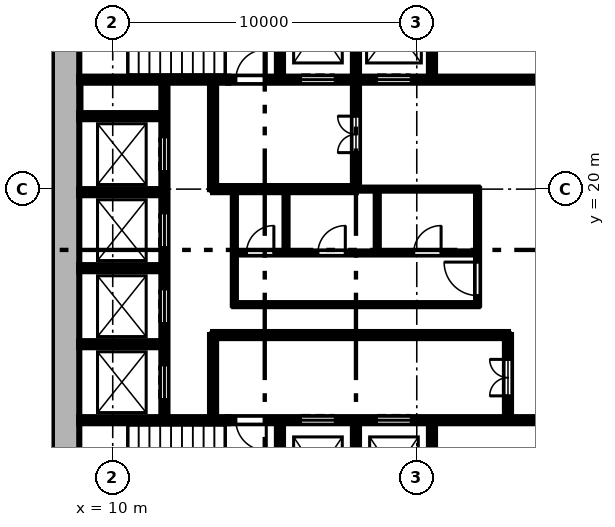
"""IFC4 building model, lengths in metres.
Left out: names, types, materials, properties, quantities, classifications, styles, units other than length and angle.
Written with IfcOpenShell. Run it as: python <this file> out.ifc"""

import sys

from ifc_helpers import new_model, si_unit, direction, frame, frame_2d, origin, place, context, subcontext, project, spatial, rectangle, extrude, element, fill, save


model = new_model("IFC4")
c1 = context("Model", 3, precision=1e-05, world=origin(), true_north=direction((0.0, 1.0)))
c2 = subcontext(c1, "Body", "Model", "MODEL_VIEW")
j1 = project(units=[si_unit("LENGTHUNIT", "METRE"), si_unit("PLANEANGLEUNIT", "RADIAN")], contexts=[c1])
p1 = place(None, origin())
s1 = spatial("IfcSite", under=j1, at=p1, CompositionType="ELEMENT")
p2 = place(p1, origin())
s2 = spatial("IfcBuilding", under=s1, at=p2, CompositionType="ELEMENT")
p3 = place(p2, origin())
s3 = spatial("IfcBuildingStorey", under=s2, at=p3, CompositionType="ELEMENT", Elevation=0.0)
p4 = place(p3, frame((8.45, 27.1, 0.0), z_axis=(0.0, 0.0, 1.0), x_axis=(0.0, -1.0, 0.0)))
e1 = element("IfcWall", 1, at=p4, inside=s3, PredefinedType="SHEAR", context=c2, shape_type="SweptSolid", body=[
    extrude(rectangle(XDim=18.2, YDim=0.9, at=frame_2d((9.1, 0.0))), origin(), (0.0, 0.0, 1.0), 6.0),
])
p5 = place(p3, frame((8.9, 12.4, 0.0), z_axis=(0.0, 0.0, 1.0), x_axis=(1.0, 0.0, 0.0)))
e2 = element("IfcWall", 2, at=p5, inside=s3, PredefinedType="SHEAR", context=c2, shape_type="SweptSolid", body=[
    extrude(rectangle(XDim=4.9, YDim=0.2, at=frame_2d((2.45, 0.0))), origin(), (0.0, 0.0, 1.0), 5.55),
])
p6 = place(p3, frame((13.8, 12.4, 0.0), z_axis=(0.0, 0.0, 1.0), x_axis=(1.0, 0.0, 0.0)))
e3 = element("IfcWall", 3, at=p6, inside=s3, PredefinedType="SHEAR", context=c2, shape_type="SweptSolid", body=[
    extrude(rectangle(XDim=13.3, YDim=0.2, at=frame_2d((6.65, 0.0))), origin(), (0.0, 0.0, 1.0), 5.55),
])
p7 = place(p6, frame((2.4, 0.0, 0.0)))
e4 = element("IfcOpeningElement", 4, at=p7, cuts=e3, PredefinedType="OPENING", context=c2, shape_type="SweptSolid", body=[
    extrude(rectangle(XDim=1.1, YDim=2.1, at=frame_2d((0.55, 1.05))), frame((0.0, 0.11, 0.0), z_axis=(0.0, -1.0, 0.0), x_axis=(1.0, 0.0, 0.0)), (0.0, 0.0, 1.0), 0.22),
])
p8 = place(p6, frame((4.9, 0.0, 0.0)))
e5 = element("IfcOpeningElement", 5, at=p8, cuts=e3, PredefinedType="OPENING", context=c2, shape_type="SweptSolid", body=[
    extrude(rectangle(XDim=1.1, YDim=2.1, at=frame_2d((0.55, 1.05))), frame((0.0, 0.11, 0.0), z_axis=(0.0, -1.0, 0.0), x_axis=(1.0, 0.0, 0.0)), (0.0, 0.0, 1.0), 0.22),
])
p9 = place(p6, frame((0.25, 0.0, 0.0)))
e6 = element("IfcOpeningElement", 6, at=p9, cuts=e3, PredefinedType="OPENING", context=c2, shape_type="SweptSolid", body=[
    extrude(rectangle(XDim=1.0, YDim=2.1, at=frame_2d((0.5, 1.05))), frame((0.0, 0.11, 0.0), z_axis=(0.0, -1.0, 0.0), x_axis=(1.0, 0.0, 0.0)), (0.0, 0.0, 1.0), 0.22),
])
p10 = place(p3, frame((8.9, 14.9, 0.0), z_axis=(0.0, 0.0, 1.0), x_axis=(1.0, 0.0, 0.0)))
e7 = element("IfcWall", 7, at=p10, inside=s3, PredefinedType="SHEAR", context=c2, shape_type="SweptSolid", body=[
    extrude(rectangle(XDim=2.8, YDim=0.2, at=frame_2d((1.4, 0.0))), origin(), (0.0, 0.0, 1.0), 5.55),
])
p11 = place(p3, frame((13.3, 15.2, 0.0), z_axis=(0.0, 0.0, 1.0), x_axis=(1.0, 0.0, 0.0)))
e8 = element("IfcWall", 8, at=p11, inside=s3, PredefinedType="SHEAR", context=c2, shape_type="SweptSolid", body=[
    extrude(rectangle(XDim=9.7, YDim=0.2, at=frame_2d((4.85, 0.0))), origin(), (0.0, 0.0, 1.0), 5.55),
])
p12 = place(p3, frame((14.0, 16.2, 0.0), z_axis=(0.0, 0.0, 1.0), x_axis=(1.0, 0.0, 0.0)))
e9 = element("IfcWall", 9, at=p12, inside=s3, PredefinedType="PARTITIONING", context=c2, shape_type="SweptSolid", body=[
    extrude(rectangle(XDim=8.0, YDim=0.1, at=frame_2d((4.0, 0.0))), origin(), (0.0, 0.0, 1.0), 5.55),
])
p13 = place(p3, frame((8.9, 17.4, 0.0), z_axis=(0.0, 0.0, 1.0), x_axis=(1.0, 0.0, 0.0)))
e10 = element("IfcWall", 10, at=p13, inside=s3, PredefinedType="SHEAR", context=c2, shape_type="SweptSolid", body=[
    extrude(rectangle(XDim=2.8, YDim=0.2, at=frame_2d((1.4, 0.0))), origin(), (0.0, 0.0, 1.0), 5.55),
])
p14 = place(p3, frame((14.0, 17.9, 0.0), z_axis=(0.0, 0.0, 1.0), x_axis=(1.0, 0.0, 0.0)))
e11 = element("IfcWall", 11, at=p14, inside=s3, PredefinedType="PARTITIONING", context=c2, shape_type="SweptSolid", body=[
    extrude(rectangle(XDim=8.0, YDim=0.1, at=frame_2d((4.0, 0.0))), origin(), (0.0, 0.0, 1.0), 5.55),
])
p15 = place(p14, frame((0.4, 0.0, 0.0)))
e12 = element("IfcOpeningElement", 12, at=p15, cuts=e11, PredefinedType="OPENING", context=c2, shape_type="SweptSolid", body=[
    extrude(rectangle(XDim=0.9, YDim=2.1, at=frame_2d((0.45, 1.05))), frame((0.0, 0.06, 0.0), z_axis=(0.0, -1.0, 0.0), x_axis=(1.0, 0.0, 0.0)), (0.0, 0.0, 1.0), 0.12),
])
p16 = place(p14, frame((2.75, 0.0, 0.0)))
e13 = element("IfcOpeningElement", 13, at=p16, cuts=e11, PredefinedType="OPENING", context=c2, shape_type="SweptSolid", body=[
    extrude(rectangle(XDim=0.9, YDim=2.1, at=frame_2d((0.45, 1.05))), frame((0.0, 0.06, 0.0), z_axis=(0.0, -1.0, 0.0), x_axis=(1.0, 0.0, 0.0)), (0.0, 0.0, 1.0), 0.12),
])
p17 = place(p14, frame((5.9, 0.0, 0.0)))
e14 = element("IfcOpeningElement", 14, at=p17, cuts=e11, PredefinedType="OPENING", context=c2, shape_type="SweptSolid", body=[
    extrude(rectangle(XDim=0.9, YDim=2.1, at=frame_2d((0.45, 1.05))), frame((0.0, 0.06, 0.0), z_axis=(0.0, -1.0, 0.0), x_axis=(1.0, 0.0, 0.0)), (0.0, 0.0, 1.0), 0.12),
])
p18 = place(p3, frame((8.9, 19.9, 0.0), z_axis=(0.0, 0.0, 1.0), x_axis=(1.0, 0.0, 0.0)))
e15 = element("IfcWall", 15, at=p18, inside=s3, PredefinedType="SHEAR", context=c2, shape_type="SweptSolid", body=[
    extrude(rectangle(XDim=2.8, YDim=0.2, at=frame_2d((1.4, 0.0))), origin(), (0.0, 0.0, 1.0), 5.55),
])
p19 = place(p3, frame((18.0, 20.0, 0.0), z_axis=(0.0, 0.0, 1.0), x_axis=(1.0, 0.0, 0.0)))
e16 = element("IfcWall", 16, at=p19, inside=s3, PredefinedType="PARTITIONING", context=c2, shape_type="SweptSolid", body=[
    extrude(rectangle(XDim=4.0, YDim=0.1, at=frame_2d((2.0, 0.0))), origin(), (0.0, 0.0, 1.0), 5.55),
])
p20 = place(p3, frame((13.3, 20.0, 0.0), z_axis=(0.0, 0.0, 1.0), x_axis=(1.0, 0.0, 0.0)))
e17 = element("IfcWall", 17, at=p20, inside=s3, PredefinedType="SHEAR", context=c2, shape_type="SweptSolid", body=[
    extrude(rectangle(XDim=4.7, YDim=0.2, at=frame_2d((2.35, 0.0))), origin(), (0.0, 0.0, 1.0), 5.55),
])
p21 = place(p3, frame((8.9, 22.4, 0.0), z_axis=(0.0, 0.0, 1.0), x_axis=(1.0, 0.0, 0.0)))
e18 = element("IfcWall", 18, at=p21, inside=s3, PredefinedType="SHEAR", context=c2, shape_type="SweptSolid", body=[
    extrude(rectangle(XDim=2.8, YDim=0.2, at=frame_2d((1.4, 0.0))), origin(), (0.0, 0.0, 1.0), 5.55),
])
p22 = place(p3, frame((8.9, 23.6, 0.0), z_axis=(0.0, 0.0, 1.0), x_axis=(1.0, 0.0, 0.0)))
e19 = element("IfcWall", 19, at=p22, inside=s3, PredefinedType="SHEAR", context=c2, shape_type="SweptSolid", body=[
    extrude(rectangle(XDim=4.9, YDim=0.2, at=frame_2d((2.45, 0.0))), origin(), (0.0, 0.0, 1.0), 5.55),
])
p23 = place(p3, frame((13.8, 23.6, 0.0), z_axis=(0.0, 0.0, 1.0), x_axis=(1.0, 0.0, 0.0)))
e20 = element("IfcWall", 20, at=p23, inside=s3, PredefinedType="SHEAR", context=c2, shape_type="SweptSolid", body=[
    extrude(rectangle(XDim=13.3, YDim=0.2, at=frame_2d((6.65, 0.0))), origin(), (0.0, 0.0, 1.0), 5.55),
])
p24 = place(p23, frame((2.4, 0.0, 0.0)))
e21 = element("IfcOpeningElement", 21, at=p24, cuts=e20, PredefinedType="OPENING", context=c2, shape_type="SweptSolid", body=[
    extrude(rectangle(XDim=1.1, YDim=2.1, at=frame_2d((0.55, 1.05))), frame((0.0, 0.11, 0.0), z_axis=(0.0, -1.0, 0.0), x_axis=(1.0, 0.0, 0.0)), (0.0, 0.0, 1.0), 0.22),
])
p25 = place(p23, frame((4.9, 0.0, 0.0)))
e22 = element("IfcOpeningElement", 22, at=p25, cuts=e20, PredefinedType="OPENING", context=c2, shape_type="SweptSolid", body=[
    extrude(rectangle(XDim=1.1, YDim=2.1, at=frame_2d((0.55, 1.05))), frame((0.0, 0.11, 0.0), z_axis=(0.0, -1.0, 0.0), x_axis=(1.0, 0.0, 0.0)), (0.0, 0.0, 1.0), 0.22),
])
p26 = place(p23, frame((0.25, 0.0, 0.0)))
e23 = element("IfcOpeningElement", 23, at=p26, cuts=e20, PredefinedType="OPENING", context=c2, shape_type="SweptSolid", body=[
    extrude(rectangle(XDim=1.0, YDim=2.1, at=frame_2d((0.5, 1.05))), frame((0.0, 0.11, 0.0), z_axis=(0.0, -1.0, 0.0), x_axis=(1.0, 0.0, 0.0)), (0.0, 0.0, 1.0), 0.22),
])
p27 = place(p3, frame((11.7, 12.4, 0.0), z_axis=(0.0, 0.0, 1.0), x_axis=(0.0, 1.0, 0.0)))
e24 = element("IfcWall", 24, at=p27, inside=s3, PredefinedType="SHEAR", context=c2, shape_type="SweptSolid", body=[
    extrude(rectangle(XDim=11.2, YDim=0.2, at=frame_2d((5.6, 0.0))), origin(), (0.0, 0.0, 1.0), 5.55),
])
p28 = place(p27, frame((0.7, 0.0, 0.0)))
e25 = element("IfcOpeningElement", 25, at=p28, cuts=e24, PredefinedType="OPENING", context=c2, shape_type="SweptSolid", body=[
    extrude(rectangle(XDim=1.1, YDim=2.1, at=frame_2d((0.55, 1.05))), frame((0.0, 0.11, 0.0), z_axis=(0.0, -1.0, 0.0), x_axis=(1.0, 0.0, 0.0)), (0.0, 0.0, 1.0), 0.22),
])
p29 = place(p27, frame((3.2, 0.0, 0.0)))
e26 = element("IfcOpeningElement", 26, at=p29, cuts=e24, PredefinedType="OPENING", context=c2, shape_type="SweptSolid", body=[
    extrude(rectangle(XDim=1.1, YDim=2.1, at=frame_2d((0.55, 1.05))), frame((0.0, 0.11, 0.0), z_axis=(0.0, -1.0, 0.0), x_axis=(1.0, 0.0, 0.0)), (0.0, 0.0, 1.0), 0.22),
])
p30 = place(p27, frame((5.7, 0.0, 0.0)))
e27 = element("IfcOpeningElement", 27, at=p30, cuts=e24, PredefinedType="OPENING", context=c2, shape_type="SweptSolid", body=[
    extrude(rectangle(XDim=1.1, YDim=2.1, at=frame_2d((0.55, 1.05))), frame((0.0, 0.11, 0.0), z_axis=(0.0, -1.0, 0.0), x_axis=(1.0, 0.0, 0.0)), (0.0, 0.0, 1.0), 0.22),
])
p31 = place(p27, frame((8.2, 0.0, 0.0)))
e28 = element("IfcOpeningElement", 28, at=p31, cuts=e24, PredefinedType="OPENING", context=c2, shape_type="SweptSolid", body=[
    extrude(rectangle(XDim=1.1, YDim=2.1, at=frame_2d((0.55, 1.05))), frame((0.0, 0.11, 0.0), z_axis=(0.0, -1.0, 0.0), x_axis=(1.0, 0.0, 0.0)), (0.0, 0.0, 1.0), 0.22),
])
p32 = place(p3, frame((13.3, 12.4, 0.0), z_axis=(0.0, 0.0, 1.0), x_axis=(0.0, 1.0, 0.0)))
e29 = element("IfcWall", 29, at=p32, inside=s3, PredefinedType="SHEAR", context=c2, shape_type="SweptSolid", body=[
    extrude(rectangle(XDim=2.8, YDim=0.2, at=frame_2d((1.4, 0.0))), origin(), (0.0, 0.0, 1.0), 5.55),
])
p33 = place(p3, frame((13.3, 20.0, 0.0), z_axis=(0.0, 0.0, 1.0), x_axis=(0.0, 1.0, 0.0)))
e30 = element("IfcWall", 30, at=p33, inside=s3, PredefinedType="SHEAR", context=c2, shape_type="SweptSolid", body=[
    extrude(rectangle(XDim=3.6, YDim=0.2, at=frame_2d((1.8, 0.0))), origin(), (0.0, 0.0, 1.0), 5.55),
])
p34 = place(p3, frame((14.0, 16.2, 0.0), z_axis=(0.0, 0.0, 1.0), x_axis=(0.0, 1.0, 0.0)))
e31 = element("IfcWall", 31, at=p34, inside=s3, PredefinedType="PARTITIONING", context=c2, shape_type="SweptSolid", body=[
    extrude(rectangle(XDim=3.8, YDim=0.1, at=frame_2d((1.9, 0.0))), origin(), (0.0, 0.0, 1.0), 5.55),
])
for number, where, z_axis, x_axis in (
    (32, (15.5, 8.9, 0.0), (0.0, 0.0, 1.0), (0.0, 1.0, 0.0)),
    (33, (15.5, 23.6, 0.0), (0.0, 0.0, 1.0), (0.0, 1.0, 0.0)),
):
    element("IfcWall", number, at=place(p3, frame(where, z_axis=z_axis, x_axis=x_axis)), inside=s3, PredefinedType="SHEAR", context=c2, shape_type="SweptSolid", body=[
        extrude(rectangle(XDim=3.5, YDim=0.2, at=frame_2d((1.75, 0.0))), origin(), (0.0, 0.0, 1.0), 5.55),
    ])
p35 = place(p3, frame((15.7, 17.9, 0.0), z_axis=(0.0, 0.0, 1.0), x_axis=(0.0, 1.0, 0.0)))
e34 = element("IfcWall", 34, at=p35, inside=s3, PredefinedType="PARTITIONING", context=c2, shape_type="SweptSolid", body=[
    extrude(rectangle(XDim=2.1, YDim=0.1, at=frame_2d((1.05, 0.0))), origin(), (0.0, 0.0, 1.0), 5.55),
])
p36 = place(p3, frame((18.0, 8.9, 0.0), z_axis=(0.0, 0.0, 1.0), x_axis=(0.0, 1.0, 0.0)))
e35 = element("IfcWall", 35, at=p36, inside=s3, PredefinedType="SHEAR", context=c2, shape_type="SweptSolid", body=[
    extrude(rectangle(XDim=3.5, YDim=0.2, at=frame_2d((1.75, 0.0))), origin(), (0.0, 0.0, 1.0), 5.55),
])
p37 = place(p3, frame((18.0, 20.0, 0.0), z_axis=(0.0, 0.0, 1.0), x_axis=(0.0, 1.0, 0.0)))
e36 = element("IfcWall", 36, at=p37, inside=s3, PredefinedType="SHEAR", context=c2, shape_type="SweptSolid", body=[
    extrude(rectangle(XDim=7.1, YDim=0.2, at=frame_2d((3.55, 0.0))), origin(), (0.0, 0.0, 1.0), 5.55),
])
p38 = place(p37, frame((1.2, 0.0, 0.0)))
e37 = element("IfcOpeningElement", 37, at=p38, cuts=e36, PredefinedType="OPENING", context=c2, shape_type="SweptSolid", body=[
    extrude(rectangle(XDim=1.2, YDim=2.1, at=frame_2d((0.6, 1.05))), frame((0.0, 0.11, 0.0), z_axis=(0.0, -1.0, 0.0), x_axis=(1.0, 0.0, 0.0)), (0.0, 0.0, 1.0), 0.22),
])
p39 = place(p3, frame((18.7, 17.9, 0.0), z_axis=(0.0, 0.0, 1.0), x_axis=(0.0, 1.0, 0.0)))
e38 = element("IfcWall", 38, at=p39, inside=s3, PredefinedType="PARTITIONING", context=c2, shape_type="SweptSolid", body=[
    extrude(rectangle(XDim=2.1, YDim=0.1, at=frame_2d((1.05, 0.0))), origin(), (0.0, 0.0, 1.0), 5.55),
])
for number, where, z_axis, x_axis in (
    (39, (20.5, 8.9, 0.0), (0.0, 0.0, 1.0), (0.0, 1.0, 0.0)),
    (40, (20.5, 23.6, 0.0), (0.0, 0.0, 1.0), (0.0, 1.0, 0.0)),
):
    element("IfcWall", number, at=place(p3, frame(where, z_axis=z_axis, x_axis=x_axis)), inside=s3, PredefinedType="SHEAR", context=c2, shape_type="SweptSolid", body=[
        extrude(rectangle(XDim=3.5, YDim=0.2, at=frame_2d((1.75, 0.0))), origin(), (0.0, 0.0, 1.0), 5.55),
    ])
p40 = place(p3, frame((22.0, 16.2, 0.0), z_axis=(0.0, 0.0, 1.0), x_axis=(0.0, 1.0, 0.0)))
e41 = element("IfcWall", 41, at=p40, inside=s3, PredefinedType="PARTITIONING", context=c2, shape_type="SweptSolid", body=[
    extrude(rectangle(XDim=3.8, YDim=0.1, at=frame_2d((1.9, 0.0))), origin(), (0.0, 0.0, 1.0), 5.55),
])
p41 = place(p40, frame((0.3, 0.0, 0.0)))
e42 = element("IfcOpeningElement", 42, at=p41, cuts=e41, PredefinedType="OPENING", context=c2, shape_type="SweptSolid", body=[
    extrude(rectangle(XDim=1.1, YDim=2.1, at=frame_2d((0.55, 1.05))), frame((0.0, 0.06, 0.0), z_axis=(0.0, -1.0, 0.0), x_axis=(1.0, 0.0, 0.0)), (0.0, 0.0, 1.0), 0.12),
])
p42 = place(p3, frame((23.0, 12.4, 0.0), z_axis=(0.0, 0.0, 1.0), x_axis=(0.0, 1.0, 0.0)))
e43 = element("IfcWall", 43, at=p42, inside=s3, PredefinedType="SHEAR", context=c2, shape_type="SweptSolid", body=[
    extrude(rectangle(XDim=2.8, YDim=0.2, at=frame_2d((1.4, 0.0))), origin(), (0.0, 0.0, 1.0), 5.55),
])
p43 = place(p42, frame((0.8, 0.0, 0.0)))
e44 = element("IfcOpeningElement", 44, at=p43, cuts=e43, PredefinedType="OPENING", context=c2, shape_type="SweptSolid", body=[
    extrude(rectangle(XDim=1.2, YDim=2.1, at=frame_2d((0.6, 1.05))), frame((0.0, 0.11, 0.0), z_axis=(0.0, -1.0, 0.0), x_axis=(1.0, 0.0, 0.0)), (0.0, 0.0, 1.0), 0.22),
])
p44 = place(p28, origin())
e45 = element("IfcDoor", 45, at=p44, inside=s3, OperationType="DOUBLE_DOOR_SLIDING", PredefinedType="DOOR", context=c2, shape_type="SweptSolid", body=[
    extrude(rectangle(XDim=1.1, YDim=2.1, at=frame_2d((0.55, 1.05))), frame((0.0, 0.025, 0.0), z_axis=(0.0, -1.0, 0.0), x_axis=(1.0, 0.0, 0.0)), (0.0, 0.0, 1.0), 0.05),
])
fill(e25, e45)
p45 = place(p29, origin())
e46 = element("IfcDoor", 46, at=p45, inside=s3, OperationType="DOUBLE_DOOR_SLIDING", PredefinedType="DOOR", context=c2, shape_type="SweptSolid", body=[
    extrude(rectangle(XDim=1.1, YDim=2.1, at=frame_2d((0.55, 1.05))), frame((0.0, 0.025, 0.0), z_axis=(0.0, -1.0, 0.0), x_axis=(1.0, 0.0, 0.0)), (0.0, 0.0, 1.0), 0.05),
])
fill(e26, e46)
p46 = place(p30, origin())
e47 = element("IfcDoor", 47, at=p46, inside=s3, OperationType="DOUBLE_DOOR_SLIDING", PredefinedType="DOOR", context=c2, shape_type="SweptSolid", body=[
    extrude(rectangle(XDim=1.1, YDim=2.1, at=frame_2d((0.55, 1.05))), frame((0.0, 0.025, 0.0), z_axis=(0.0, -1.0, 0.0), x_axis=(1.0, 0.0, 0.0)), (0.0, 0.0, 1.0), 0.05),
])
fill(e27, e47)
p47 = place(p31, origin())
e48 = element("IfcDoor", 48, at=p47, inside=s3, OperationType="DOUBLE_DOOR_SLIDING", PredefinedType="DOOR", context=c2, shape_type="SweptSolid", body=[
    extrude(rectangle(XDim=1.1, YDim=2.1, at=frame_2d((0.55, 1.05))), frame((0.0, 0.025, 0.0), z_axis=(0.0, -1.0, 0.0), x_axis=(1.0, 0.0, 0.0)), (0.0, 0.0, 1.0), 0.05),
])
fill(e28, e48)
p48 = place(p7, origin())
e49 = element("IfcDoor", 49, at=p48, inside=s3, OperationType="DOUBLE_DOOR_SLIDING", PredefinedType="DOOR", context=c2, shape_type="SweptSolid", body=[
    extrude(rectangle(XDim=1.1, YDim=2.1, at=frame_2d((0.55, 1.05))), frame((0.0, 0.025, 0.0), z_axis=(0.0, -1.0, 0.0), x_axis=(1.0, 0.0, 0.0)), (0.0, 0.0, 1.0), 0.05),
])
fill(e4, e49)
p49 = place(p8, origin())
e50 = element("IfcDoor", 50, at=p49, inside=s3, OperationType="DOUBLE_DOOR_SLIDING", PredefinedType="DOOR", context=c2, shape_type="SweptSolid", body=[
    extrude(rectangle(XDim=1.1, YDim=2.1, at=frame_2d((0.55, 1.05))), frame((0.0, 0.025, 0.0), z_axis=(0.0, -1.0, 0.0), x_axis=(1.0, 0.0, 0.0)), (0.0, 0.0, 1.0), 0.05),
])
fill(e5, e50)
p50 = place(p24, origin())
e51 = element("IfcDoor", 51, at=p50, inside=s3, OperationType="DOUBLE_DOOR_SLIDING", PredefinedType="DOOR", context=c2, shape_type="SweptSolid", body=[
    extrude(rectangle(XDim=1.1, YDim=2.1, at=frame_2d((0.55, 1.05))), frame((0.0, 0.025, 0.0), z_axis=(0.0, -1.0, 0.0), x_axis=(1.0, 0.0, 0.0)), (0.0, 0.0, 1.0), 0.05),
])
fill(e21, e51)
p51 = place(p25, origin())
e52 = element("IfcDoor", 52, at=p51, inside=s3, OperationType="DOUBLE_DOOR_SLIDING", PredefinedType="DOOR", context=c2, shape_type="SweptSolid", body=[
    extrude(rectangle(XDim=1.1, YDim=2.1, at=frame_2d((0.55, 1.05))), frame((0.0, 0.025, 0.0), z_axis=(0.0, -1.0, 0.0), x_axis=(1.0, 0.0, 0.0)), (0.0, 0.0, 1.0), 0.05),
])
fill(e22, e52)
p52 = place(p9, frame((1.0, 0.0, 0.0), z_axis=(0.0, 0.0, 1.0), x_axis=(-1.0, 0.0, 0.0)))
e53 = element("IfcDoor", 53, at=p52, inside=s3, OperationType="SINGLE_SWING_LEFT", PredefinedType="DOOR", context=c2, shape_type="SweptSolid", body=[
    extrude(rectangle(XDim=1.0, YDim=2.1, at=frame_2d((0.5, 1.05))), frame((0.0, 0.025, 0.0), z_axis=(0.0, -1.0, 0.0), x_axis=(1.0, 0.0, 0.0)), (0.0, 0.0, 1.0), 0.05),
])
fill(e6, e53)
p53 = place(p26, origin())
e54 = element("IfcDoor", 54, at=p53, inside=s3, OperationType="SINGLE_SWING_RIGHT", PredefinedType="DOOR", context=c2, shape_type="SweptSolid", body=[
    extrude(rectangle(XDim=1.0, YDim=2.1, at=frame_2d((0.5, 1.05))), frame((0.0, 0.025, 0.0), z_axis=(0.0, -1.0, 0.0), x_axis=(1.0, 0.0, 0.0)), (0.0, 0.0, 1.0), 0.05),
])
fill(e23, e54)
p54 = place(p43, origin())
e55 = element("IfcDoor", 55, at=p54, inside=s3, OperationType="DOUBLE_DOOR_SINGLE_SWING", PredefinedType="DOOR", context=c2, shape_type="SweptSolid", body=[
    extrude(rectangle(XDim=1.2, YDim=2.1, at=frame_2d((0.6, 1.05))), frame((0.0, 0.025, 0.0), z_axis=(0.0, -1.0, 0.0), x_axis=(1.0, 0.0, 0.0)), (0.0, 0.0, 1.0), 0.05),
])
fill(e44, e55)
p55 = place(p38, origin())
e56 = element("IfcDoor", 56, at=p55, inside=s3, OperationType="DOUBLE_DOOR_SINGLE_SWING", PredefinedType="DOOR", context=c2, shape_type="SweptSolid", body=[
    extrude(rectangle(XDim=1.2, YDim=2.1, at=frame_2d((0.6, 1.05))), frame((0.0, 0.025, 0.0), z_axis=(0.0, -1.0, 0.0), x_axis=(1.0, 0.0, 0.0)), (0.0, 0.0, 1.0), 0.05),
])
fill(e37, e56)
p56 = place(p41, origin())
e57 = element("IfcDoor", 57, at=p56, inside=s3, OperationType="SINGLE_SWING_RIGHT", PredefinedType="DOOR", context=c2, shape_type="SweptSolid", body=[
    extrude(rectangle(XDim=1.1, YDim=2.1, at=frame_2d((0.55, 1.05))), frame((0.0, 0.025, 0.0), z_axis=(0.0, -1.0, 0.0), x_axis=(1.0, 0.0, 0.0)), (0.0, 0.0, 1.0), 0.05),
])
fill(e42, e57)
p57 = place(p15, origin())
e58 = element("IfcDoor", 58, at=p57, inside=s3, OperationType="SINGLE_SWING_RIGHT", PredefinedType="DOOR", context=c2, shape_type="SweptSolid", body=[
    extrude(rectangle(XDim=0.9, YDim=2.1, at=frame_2d((0.45, 1.05))), frame((0.0, 0.025, 0.0), z_axis=(0.0, -1.0, 0.0), x_axis=(1.0, 0.0, 0.0)), (0.0, 0.0, 1.0), 0.05),
])
fill(e12, e58)
p58 = place(p16, origin())
e59 = element("IfcDoor", 59, at=p58, inside=s3, OperationType="SINGLE_SWING_RIGHT", PredefinedType="DOOR", context=c2, shape_type="SweptSolid", body=[
    extrude(rectangle(XDim=0.9, YDim=2.1, at=frame_2d((0.45, 1.05))), frame((0.0, 0.025, 0.0), z_axis=(0.0, -1.0, 0.0), x_axis=(1.0, 0.0, 0.0)), (0.0, 0.0, 1.0), 0.05),
])
fill(e13, e59)
p59 = place(p17, origin())
e60 = element("IfcDoor", 60, at=p59, inside=s3, OperationType="SINGLE_SWING_RIGHT", PredefinedType="DOOR", context=c2, shape_type="SweptSolid", body=[
    extrude(rectangle(XDim=0.9, YDim=2.1, at=frame_2d((0.45, 1.05))), frame((0.0, 0.025, 0.0), z_axis=(0.0, -1.0, 0.0), x_axis=(1.0, 0.0, 0.0)), (0.0, 0.0, 1.0), 0.05),
])
fill(e14, e60)
save(model, sys.argv[1])
